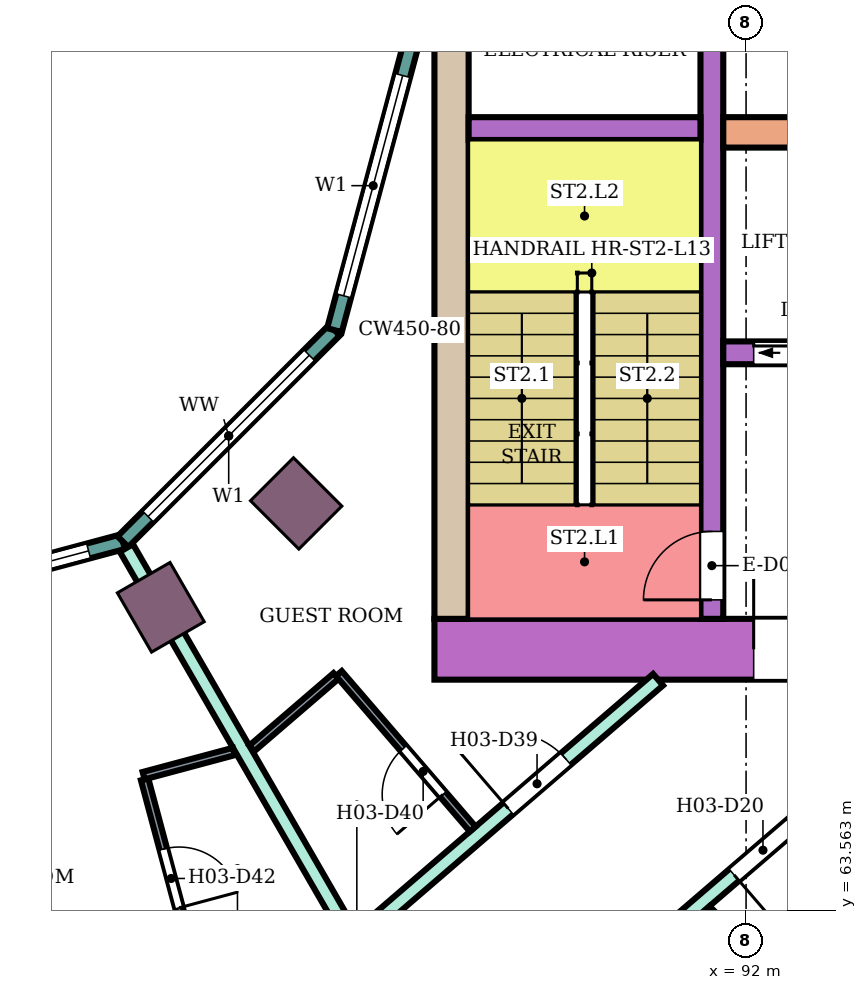
"""IFC4 building model, lengths in metres.
Left out: names, types, materials, properties, quantities, classifications, styles, units other than length and angle.
Written with IfcOpenShell. Run it as: python <this file> out.ifc"""

import sys

from ifc_helpers import new_model, si_unit, direction, frame, frame_2d, origin, origin_2d, place, context, subcontext, project, spatial, rectangle, extrude, element, fill, save


model = new_model("IFC4")
c1 = context("Model", 3, precision=1e-05, world=origin(), true_north=direction((0.0, 1.0)))
c2 = subcontext(c1, "Body", "Model", "MODEL_VIEW")
j1 = project(units=[si_unit("LENGTHUNIT", "METRE"), si_unit("PLANEANGLEUNIT", "RADIAN")], contexts=[c1])
p1 = place(None, origin())
s1 = spatial("IfcSite", under=j1, at=p1, CompositionType="ELEMENT")
p2 = place(p1, origin())
s2 = spatial("IfcBuilding", under=s1, at=p2, CompositionType="ELEMENT")
p3 = place(p2, frame((0.0, 0.0, 59.2)))
s3 = spatial("IfcBuildingStorey", under=s2, at=p3, CompositionType="ELEMENT", Elevation=59.2)
for number, where, z_axis, x_axis in (
    (1, (84.3, 67.552, 0.0), (0.0, 0.0, 1.0), (0.5, -0.866, 0.0)),
    (2, (86.081, 68.919, 0.0), (0.0, 0.0, 1.0), (0.707, -0.707, 0.0)),
):
    element("IfcColumn", number, at=place(p3, frame(where, z_axis=z_axis, x_axis=x_axis)), inside=s3, PredefinedType="COLUMN", context=c2, shape_type="SweptSolid", body=[
        extrude(rectangle(XDim=0.9, YDim=0.8, at=origin_2d()), origin(), (0.0, 0.0, 1.0), 3.8),
    ])
p4 = place(p3, frame((87.9, 67.0, 0.0), z_axis=(0.0, 0.0, 1.0), x_axis=(1.0, 0.0, 0.0)))
e3 = element("IfcWall", 3, at=p4, inside=s3, PredefinedType="SHEAR", context=c2, shape_type="SweptSolid", body=[
    extrude(rectangle(XDim=14.7, YDim=0.8, at=frame_2d((7.35, 0.0))), origin(), (0.0, 0.0, 1.0), 3.48),
])
p5 = place(p4, frame((4.2, 0.0, 0.0)))
e4 = element("IfcOpeningElement", 4, at=p5, cuts=e3, PredefinedType="OPENING", context=c2, shape_type="SweptSolid", body=[
    extrude(rectangle(XDim=2.4, YDim=2.4, at=frame_2d((1.2, 1.2))), frame((0.0, 0.41, 0.0), z_axis=(0.0, -1.0, 0.0), x_axis=(1.0, 0.0, 0.0)), (0.0, 0.0, 1.0), 0.82),
])
p6 = place(p3, frame((88.125, 67.4, 0.0), z_axis=(0.0, 0.0, 1.0), x_axis=(0.0, 1.0, 0.0)))
e5 = element("IfcWall", 5, at=p6, inside=s3, PredefinedType="SHEAR", context=c2, shape_type="SweptSolid", body=[
    extrude(rectangle(XDim=7.6, YDim=0.45, at=frame_2d((3.8, 0.0))), origin(), (0.0, 0.0, 1.0), 3.48),
])
p7 = place(p3, frame((91.55, 67.4, 0.0), z_axis=(0.0, 0.0, 1.0), x_axis=(0.0, 1.0, 0.0)))
e6 = element("IfcWall", 6, at=p7, inside=s3, PredefinedType="SHEAR", context=c2, shape_type="SweptSolid", body=[
    extrude(rectangle(XDim=7.6, YDim=0.3, at=frame_2d((3.8, 0.0))), origin(), (0.0, 0.0, 1.0), 3.48),
])
p8 = place(p7, frame((0.25, 0.0, 0.0)))
e7 = element("IfcOpeningElement", 7, at=p8, cuts=e6, PredefinedType="OPENING", context=c2, shape_type="SweptSolid", body=[
    extrude(rectangle(XDim=0.9, YDim=2.1, at=frame_2d((0.45, 1.05))), frame((0.0, 0.16, 0.0), z_axis=(0.0, -1.0, 0.0), x_axis=(1.0, 0.0, 0.0)), (0.0, 0.0, 1.0), 0.32),
])
p9 = place(p3, frame((88.35, 73.85, 0.0), z_axis=(0.0, 0.0, 1.0), x_axis=(1.0, 0.0, 0.0)))
e8 = element("IfcWall", 8, at=p9, inside=s3, PredefinedType="SHEAR", context=c2, shape_type="SweptSolid", body=[
    extrude(rectangle(XDim=3.05, YDim=0.3, at=frame_2d((1.525, 0.0))), origin(), (0.0, 0.0, 1.0), 3.48),
])
p10 = place(p3, frame((91.7, 73.8, 0.0), z_axis=(0.0, 0.0, 1.0), x_axis=(1.0, 0.0, 0.0)))
e9 = element("IfcWall", 9, at=p10, inside=s3, PredefinedType="SHEAR", context=c2, shape_type="SweptSolid", body=[
    extrude(rectangle(XDim=10.9, YDim=0.4, at=frame_2d((5.45, 0.0))), origin(), (0.0, 0.0, 1.0), 3.48),
])
p11 = place(p3, frame((91.7, 70.9, 0.0), z_axis=(0.0, 0.0, 1.0), x_axis=(1.0, 0.0, 0.0)))
e10 = element("IfcWall", 10, at=p11, inside=s3, PredefinedType="SHEAR", context=c2, shape_type="SweptSolid", body=[
    extrude(rectangle(XDim=10.9, YDim=0.3, at=frame_2d((5.45, 0.0))), origin(), (0.0, 0.0, 1.0), 3.48),
])
p12 = place(p11, frame((0.4, 0.0, 0.0)))
e11 = element("IfcOpeningElement", 11, at=p12, cuts=e10, PredefinedType="OPENING", context=c2, shape_type="SweptSolid", body=[
    extrude(rectangle(XDim=1.4, YDim=2.1, at=frame_2d((0.7, 1.05))), frame((0.0, 0.16, 0.0), z_axis=(0.0, -1.0, 0.0), x_axis=(1.0, 0.0, 0.0)), (0.0, 0.0, 1.0), 0.32),
])
p13 = place(p11, frame((5.4, 0.0, 0.0)))
e12 = element("IfcOpeningElement", 12, at=p13, cuts=e10, PredefinedType="OPENING", context=c2, shape_type="SweptSolid", body=[
    extrude(rectangle(XDim=1.4, YDim=2.1, at=frame_2d((0.7, 1.05))), frame((0.0, 0.16, 0.0), z_axis=(0.0, -1.0, 0.0), x_axis=(1.0, 0.0, 0.0)), (0.0, 0.0, 1.0), 0.32),
])
p14 = place(p11, frame((8.1, 0.0, 0.0)))
e13 = element("IfcOpeningElement", 13, at=p14, cuts=e10, PredefinedType="OPENING", context=c2, shape_type="SweptSolid", body=[
    extrude(rectangle(XDim=1.0, YDim=2.1, at=frame_2d((0.5, 1.05))), frame((0.0, 0.16, 0.0), z_axis=(0.0, -1.0, 0.0), x_axis=(1.0, 0.0, 0.0)), (0.0, 0.0, 1.0), 0.32),
])
p15 = place(p3, frame((80.0, 67.396, 0.0), z_axis=(0.0, 0.0, 1.0), x_axis=(0.965933654434, 0.258789828301, 0.0)))
e14 = element("IfcWall", 14, at=p15, inside=s3, PredefinedType="NOTDEFINED", context=c2, shape_type="SweptSolid", body=[
    extrude(rectangle(XDim=3.936, YDim=0.2, at=frame_2d((1.968, 0.0))), origin(), (0.0, 0.0, 1.0), 3.8),
])
p16 = place(p15, frame((0.468, 0.0, 0.9)))
e15 = element("IfcOpeningElement", 15, at=p16, cuts=e14, PredefinedType="OPENING", context=c2, shape_type="SweptSolid", body=[
    extrude(rectangle(XDim=3.0, YDim=2.3, at=frame_2d((1.5, 1.15))), frame((0.0, 0.11, 0.0), z_axis=(0.0, -1.0, 0.0), x_axis=(1.0, 0.0, 0.0)), (0.0, 0.0, 1.0), 0.22),
])
p17 = place(p3, frame((83.802, 68.415, 0.0), z_axis=(0.0, 0.0, 1.0), x_axis=(0.707106781187, 0.707106781187, 0.0)))
e16 = element("IfcWall", 16, at=p17, inside=s3, PredefinedType="NOTDEFINED", context=c2, shape_type="SweptSolid", body=[
    extrude(rectangle(XDim=3.936, YDim=0.2, at=frame_2d((1.968, 0.0))), origin(), (0.0, 0.0, 1.0), 3.8),
])
p18 = place(p17, frame((0.468, 0.0, 0.9)))
e17 = element("IfcOpeningElement", 17, at=p18, cuts=e16, PredefinedType="OPENING", context=c2, shape_type="SweptSolid", body=[
    extrude(rectangle(XDim=3.0, YDim=2.3, at=frame_2d((1.5, 1.15))), frame((0.0, 0.11, 0.0), z_axis=(0.0, -1.0, 0.0), x_axis=(1.0, 0.0, 0.0)), (0.0, 0.0, 1.0), 0.22),
])
p19 = place(p3, frame((86.585, 71.198, 0.0), z_axis=(0.0, 0.0, 1.0), x_axis=(0.258789828301, 0.965933654434, 0.0)))
e18 = element("IfcWall", 18, at=p19, inside=s3, PredefinedType="NOTDEFINED", context=c2, shape_type="SweptSolid", body=[
    extrude(rectangle(XDim=3.936, YDim=0.2, at=frame_2d((1.968, 0.0))), origin(), (0.0, 0.0, 1.0), 3.8),
])
p20 = place(p19, frame((0.468, 0.0, 0.9)))
e19 = element("IfcOpeningElement", 19, at=p20, cuts=e18, PredefinedType="OPENING", context=c2, shape_type="SweptSolid", body=[
    extrude(rectangle(XDim=3.0, YDim=2.3, at=frame_2d((1.5, 1.15))), frame((0.0, 0.11, 0.0), z_axis=(0.0, -1.0, 0.0), x_axis=(1.0, 0.0, 0.0)), (0.0, 0.0, 1.0), 0.22),
])
p21 = place(p3, frame((83.848, 68.332, 0.0), z_axis=(0.0, 0.0, 1.0), x_axis=(0.499901724708, -0.866082135617, 0.0)))
e20 = element("IfcWall", 20, at=p21, inside=s3, PredefinedType="PARTITIONING", context=c2, shape_type="SweptSolid", body=[
    extrude(rectangle(XDim=5.855, YDim=0.2, at=frame_2d((2.928, 0.0))), origin(), (0.0, 0.0, 1.0), 3.35),
])
p22 = place(p3, frame((86.877, 63.189, 0.0), z_axis=(0.0, 0.0, 1.0), x_axis=(0.758164888471, 0.652062881853, 0.0)))
e21 = element("IfcWall", 21, at=p22, inside=s3, PredefinedType="PARTITIONING", context=c2, shape_type="SweptSolid", body=[
    extrude(rectangle(XDim=5.23, YDim=0.2, at=frame_2d((2.615, 0.0))), origin(), (0.0, 0.0, 1.0), 3.35),
])
p23 = place(p22, frame((2.63, 0.0, 0.0)))
e22 = element("IfcOpeningElement", 22, at=p23, cuts=e21, PredefinedType="OPENING", context=c2, shape_type="SweptSolid", body=[
    extrude(rectangle(XDim=1.0, YDim=2.1, at=frame_2d((0.5, 1.05))), frame((0.0, 0.11, 0.0), z_axis=(0.0, -1.0, 0.0), x_axis=(1.0, 0.0, 0.0)), (0.0, 0.0, 1.0), 0.22),
])
p24 = place(p3, frame((88.236, 60.929, 0.0), z_axis=(0.0, 0.0, 1.0), x_axis=(0.758227485202, 0.651990092474, 0.0)))
e23 = element("IfcWall", 23, at=p24, inside=s3, PredefinedType="PARTITIONING", context=c2, shape_type="SweptSolid", body=[
    extrude(rectangle(XDim=6.336, YDim=0.2, at=frame_2d((3.168, 0.0))), origin(), (0.0, 0.0, 1.0), 3.35),
])
p25 = place(p24, frame((4.757, 0.0, 0.0)))
e24 = element("IfcOpeningElement", 24, at=p25, cuts=e23, PredefinedType="OPENING", context=c2, shape_type="SweptSolid", body=[
    extrude(rectangle(XDim=1.0, YDim=2.1, at=frame_2d((0.5, 1.05))), frame((0.0, 0.11, 0.0), z_axis=(0.0, -1.0, 0.0), x_axis=(1.0, 0.0, 0.0)), (0.0, 0.0, 1.0), 0.22),
])
p26 = place(p24, frame((0.43, 0.0, 0.0)))
e25 = element("IfcOpeningElement", 25, at=p26, cuts=e23, PredefinedType="OPENING", context=c2, shape_type="SweptSolid", body=[
    extrude(rectangle(XDim=1.0, YDim=2.1, at=frame_2d((0.5, 1.05))), frame((0.0, 0.11, 0.0), z_axis=(0.0, -1.0, 0.0), x_axis=(1.0, 0.0, 0.0)), (0.0, 0.0, 1.0), 0.22),
])
p27 = place(p3, frame((91.449, 63.548, 0.0), z_axis=(0.0, 0.0, 1.0), x_axis=(0.706984810649, -0.707228730688, 0.0)))
e26 = element("IfcWall", 26, at=p27, inside=s3, PredefinedType="PARTITIONING", context=c2, shape_type="SweptSolid", body=[
    extrude(rectangle(XDim=7.006, YDim=0.2, at=frame_2d((3.503, 0.0))), origin(), (0.0, 0.0, 1.0), 3.35),
])
p28 = place(p3, frame((84.087, 65.289, 0.0), z_axis=(0.0, 0.0, 1.0), x_axis=(0.258929459649, -0.965896234037, 0.0)))
e27 = element("IfcWall", 27, at=p28, inside=s3, PredefinedType="PARTITIONING", context=c2, shape_type="SweptSolid", body=[
    extrude(rectangle(XDim=2.65, YDim=0.1, at=frame_2d((1.325, 0.0))), origin(), (0.0, 0.0, 1.0), 3.35),
])
p29 = place(p28, frame((0.95, 0.0, 0.0)))
e28 = element("IfcOpeningElement", 28, at=p29, cuts=e27, PredefinedType="OPENING", context=c2, shape_type="SweptSolid", body=[
    extrude(rectangle(XDim=0.8, YDim=2.1, at=frame_2d((0.4, 1.05))), frame((0.0, 0.06, 0.0), z_axis=(0.0, -1.0, 0.0), x_axis=(1.0, 0.0, 0.0)), (0.0, 0.0, 1.0), 0.12),
])
p30 = place(p3, frame((84.074, 65.337, 0.0), z_axis=(0.0, 0.0, 1.0), x_axis=(0.965914351064, 0.258861867428, 0.0)))
e29 = element("IfcWall", 29, at=p30, inside=s3, PredefinedType="PARTITIONING", context=c2, shape_type="SweptSolid", body=[
    extrude(rectangle(XDim=1.229, YDim=0.1, at=frame_2d((0.615, 0.0))), origin(), (0.0, 0.0, 1.0), 3.35),
])
p31 = place(p3, frame((85.497, 65.696, 0.0), z_axis=(0.0, 0.0, 1.0), x_axis=(0.75817032582, 0.652056559698, 0.0)))
e30 = element("IfcWall", 30, at=p31, inside=s3, PredefinedType="PARTITIONING", context=c2, shape_type="SweptSolid", body=[
    extrude(rectangle(XDim=1.461, YDim=0.1, at=frame_2d((0.73, 0.0))), origin(), (0.0, 0.0, 1.0), 3.35),
])
p32 = place(p3, frame((86.643, 66.681, 0.0), z_axis=(0.0, 0.0, 1.0), x_axis=(0.652264876065, -0.757991115682, 0.0)))
e31 = element("IfcWall", 31, at=p32, inside=s3, PredefinedType="PARTITIONING", context=c2, shape_type="SweptSolid", body=[
    extrude(rectangle(XDim=2.699, YDim=0.1, at=frame_2d((1.35, 0.0))), origin(), (0.0, 0.0, 1.0), 3.35),
])
p33 = place(p32, frame((1.3, 0.0, 0.0)))
e32 = element("IfcOpeningElement", 32, at=p33, cuts=e31, PredefinedType="OPENING", context=c2, shape_type="SweptSolid", body=[
    extrude(rectangle(XDim=0.8, YDim=2.1, at=frame_2d((0.4, 1.05))), frame((0.0, 0.06, 0.0), z_axis=(0.0, -1.0, 0.0), x_axis=(1.0, 0.0, 0.0)), (0.0, 0.0, 1.0), 0.12),
])
p34 = place(p16, origin())
e33 = element("IfcWindow", 33, at=p34, inside=s3, PartitioningType="SINGLE_PANEL", PredefinedType="WINDOW", context=c2, shape_type="SweptSolid", body=[
    extrude(rectangle(XDim=3.0, YDim=2.3, at=frame_2d((1.5, 1.15))), frame((0.0, 0.03, 0.0), z_axis=(0.0, -1.0, 0.0), x_axis=(1.0, 0.0, 0.0)), (0.0, 0.0, 1.0), 0.06),
])
fill(e15, e33)
p35 = place(p18, origin())
e34 = element("IfcWindow", 34, at=p35, inside=s3, PartitioningType="SINGLE_PANEL", PredefinedType="WINDOW", context=c2, shape_type="SweptSolid", body=[
    extrude(rectangle(XDim=3.0, YDim=2.3, at=frame_2d((1.5, 1.15))), frame((0.0, 0.03, 0.0), z_axis=(0.0, -1.0, 0.0), x_axis=(1.0, 0.0, 0.0)), (0.0, 0.0, 1.0), 0.06),
])
fill(e17, e34)
p36 = place(p20, origin())
e35 = element("IfcWindow", 35, at=p36, inside=s3, PartitioningType="SINGLE_PANEL", PredefinedType="WINDOW", context=c2, shape_type="SweptSolid", body=[
    extrude(rectangle(XDim=3.0, YDim=2.3, at=frame_2d((1.5, 1.15))), frame((0.0, 0.03, 0.0), z_axis=(0.0, -1.0, 0.0), x_axis=(1.0, 0.0, 0.0)), (0.0, 0.0, 1.0), 0.06),
])
fill(e19, e35)
p37 = place(p25, frame((1.0, 0.0, 0.0), z_axis=(0.0, 0.0, 1.0), x_axis=(-1.0, 0.0, 0.0)))
e36 = element("IfcDoor", 36, at=p37, inside=s3, OperationType="SINGLE_SWING_RIGHT", PredefinedType="DOOR", context=c2, shape_type="SweptSolid", body=[
    extrude(rectangle(XDim=1.0, YDim=2.1, at=frame_2d((0.5, 1.05))), frame((0.0, 0.025, 0.0), z_axis=(0.0, -1.0, 0.0), x_axis=(1.0, 0.0, 0.0)), (0.0, 0.0, 1.0), 0.05),
])
fill(e24, e36)
p38 = place(p23, origin())
e37 = element("IfcDoor", 37, at=p38, inside=s3, OperationType="SINGLE_SWING_LEFT", PredefinedType="DOOR", context=c2, shape_type="SweptSolid", body=[
    extrude(rectangle(XDim=1.0, YDim=2.1, at=frame_2d((0.5, 1.05))), frame((0.0, 0.025, 0.0), z_axis=(0.0, -1.0, 0.0), x_axis=(1.0, 0.0, 0.0)), (0.0, 0.0, 1.0), 0.05),
])
fill(e22, e37)
p39 = place(p33, frame((0.8, 0.0, 0.0), z_axis=(0.0, 0.0, 1.0), x_axis=(-1.0, 0.0, 0.0)))
e38 = element("IfcDoor", 38, at=p39, inside=s3, OperationType="SINGLE_SWING_LEFT", PredefinedType="DOOR", context=c2, shape_type="SweptSolid", body=[
    extrude(rectangle(XDim=0.8, YDim=2.1, at=frame_2d((0.4, 1.05))), frame((0.0, 0.025, 0.0), z_axis=(0.0, -1.0, 0.0), x_axis=(1.0, 0.0, 0.0)), (0.0, 0.0, 1.0), 0.05),
])
fill(e32, e38)
p40 = place(p29, origin())
e39 = element("IfcDoor", 39, at=p40, inside=s3, OperationType="SINGLE_SWING_RIGHT", PredefinedType="DOOR", context=c2, shape_type="SweptSolid", body=[
    extrude(rectangle(XDim=0.8, YDim=2.1, at=frame_2d((0.4, 1.05))), frame((0.0, 0.025, 0.0), z_axis=(0.0, -1.0, 0.0), x_axis=(1.0, 0.0, 0.0)), (0.0, 0.0, 1.0), 0.05),
])
fill(e28, e39)
p41 = place(p8, origin())
e40 = element("IfcDoor", 40, at=p41, inside=s3, OperationType="SINGLE_SWING_LEFT", PredefinedType="DOOR", context=c2, shape_type="SweptSolid", body=[
    extrude(rectangle(XDim=0.9, YDim=2.1, at=frame_2d((0.45, 1.05))), frame((0.0, 0.025, 0.0), z_axis=(0.0, -1.0, 0.0), x_axis=(1.0, 0.0, 0.0)), (0.0, 0.0, 1.0), 0.05),
])
fill(e7, e40)
p42 = place(p12, origin())
e41 = element("IfcDoor", 41, at=p42, inside=s3, OperationType="DOUBLE_DOOR_SLIDING", PredefinedType="DOOR", context=c2, shape_type="SweptSolid", body=[
    extrude(rectangle(XDim=1.4, YDim=2.1, at=frame_2d((0.7, 1.05))), frame((0.0, 0.025, 0.0), z_axis=(0.0, -1.0, 0.0), x_axis=(1.0, 0.0, 0.0)), (0.0, 0.0, 1.0), 0.05),
])
fill(e11, e41)
p43 = place(p5, origin())
e42 = element("IfcDoor", 42, at=p43, inside=s3, OperationType="DOUBLE_DOOR_SINGLE_SWING", PredefinedType="DOOR", context=c2, shape_type="SweptSolid", body=[
    extrude(rectangle(XDim=2.4, YDim=2.4, at=frame_2d((1.2, 1.2))), frame((0.0, 0.025, 0.0), z_axis=(0.0, -1.0, 0.0), x_axis=(1.0, 0.0, 0.0)), (0.0, 0.0, 1.0), 0.05),
])
fill(e4, e42)
save(model, sys.argv[1])
